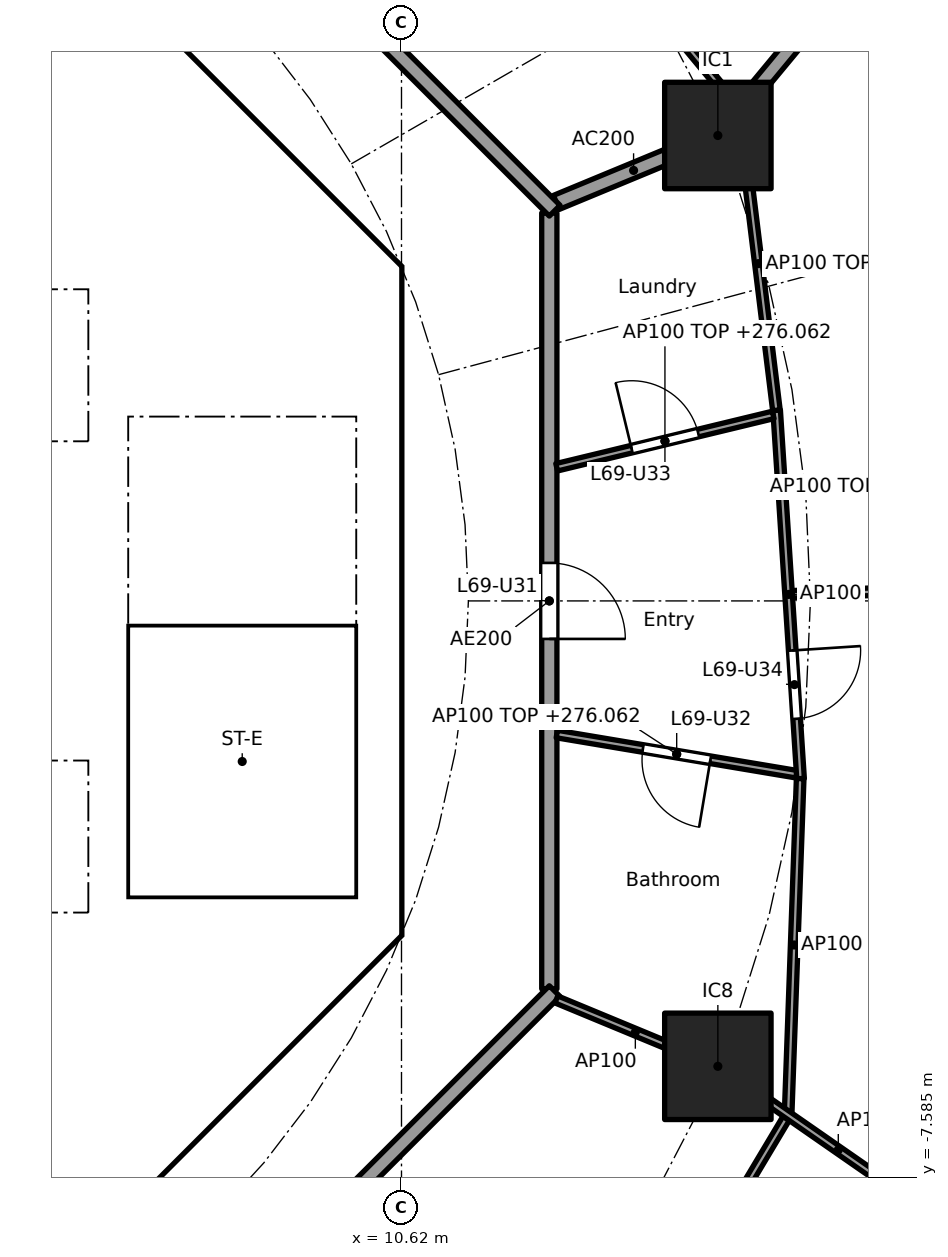
"""IFC4 building model, lengths in metres.
Left out: names, types, materials, properties, quantities, classifications, styles, units other than length and angle.
Written with IfcOpenShell. Run it as: python <this file> out.ifc"""

import sys

from ifc_helpers import new_model, si_unit, direction, frame, frame_2d, origin, origin_2d, place, context, subcontext, project, spatial, polyline, rectangle, outline, extrude, element, fill, save


model = new_model("IFC4")
c1 = context("Model", 3, precision=1e-05, world=origin(), true_north=direction((0.0, 1.0)))
c2 = subcontext(c1, "Body", "Model", "MODEL_VIEW")
j1 = project(units=[si_unit("LENGTHUNIT", "METRE"), si_unit("PLANEANGLEUNIT", "RADIAN")], contexts=[c1])
p1 = place(None, origin())
s1 = spatial("IfcSite", under=j1, at=p1, CompositionType="ELEMENT")
p2 = place(p1, origin())
s2 = spatial("IfcBuilding", under=s1, at=p2, CompositionType="ELEMENT")
p3 = place(p2, frame((0.0, 0.0, 273.3)))
s3 = spatial("IfcBuildingStorey", under=s2, at=p3, CompositionType="ELEMENT", Elevation=273.3)
for number, where, z_axis, x_axis in (
    (1, (14.782, 6.123, 0.0), (0.0, 0.0, 1.0), (1.0, 0.0, 0.0)),
    (2, (14.782, -6.123, 0.0), (0.0, 0.0, 1.0), (1.0, 0.0, 0.0)),
):
    element("IfcColumn", number, at=place(p3, frame(where, z_axis=z_axis, x_axis=x_axis)), inside=s3, PredefinedType="COLUMN", context=c2, shape_type="SweptSolid", body=[
        extrude(rectangle(XDim=1.4, YDim=1.4, at=origin_2d()), origin(), (0.0, 0.0, 1.0), 3.7),
    ])
p4 = place(p3, frame((9.988, 4.613, 0.0), z_axis=(0.0, 0.0, 1.0), x_axis=(-0.707106781187, 0.707106781187, 0.0)))
e3 = element("IfcWall", 3, at=p4, inside=s3, PredefinedType="SHEAR", context=c2, shape_type="SweptSolid", body=[
    extrude(rectangle(XDim=7.602, YDim=0.6, at=frame_2d((3.801, 0.0))), origin(), (0.0, 0.0, 1.0), 3.44),
])
p5 = place(p4, frame((3.201, 0.0, 0.0)))
e4 = element("IfcOpeningElement", 4, at=p5, cuts=e3, PredefinedType="OPENING", context=c2, shape_type="SweptSolid", body=[
    extrude(rectangle(XDim=1.2, YDim=2.1, at=frame_2d((0.6, 1.05))), frame((0.0, 0.31, 0.0), z_axis=(0.0, -1.0, 0.0), x_axis=(1.0, 0.0, 0.0)), (0.0, 0.0, 1.0), 0.62),
])
p6 = place(p3, frame((4.613, -9.988, 0.0), z_axis=(0.0, 0.0, 1.0), x_axis=(0.707106781187, 0.707106781187, 0.0)))
e5 = element("IfcWall", 5, at=p6, inside=s3, PredefinedType="SHEAR", context=c2, shape_type="SweptSolid", body=[
    extrude(rectangle(XDim=7.602, YDim=0.6, at=frame_2d((3.801, 0.0))), origin(), (0.0, 0.0, 1.0), 3.44),
])
p7 = place(p6, frame((3.201, 0.0, 0.0)))
e6 = element("IfcOpeningElement", 6, at=p7, cuts=e5, PredefinedType="OPENING", context=c2, shape_type="SweptSolid", body=[
    extrude(rectangle(XDim=1.2, YDim=2.1, at=frame_2d((0.6, 1.05))), frame((0.0, 0.31, 0.0), z_axis=(0.0, -1.0, 0.0), x_axis=(1.0, 0.0, 0.0)), (0.0, 0.0, 1.0), 0.62),
])
p8 = place(p3, frame((-6.7, 2.0, 0.0), z_axis=(0.0, 0.0, 1.0), x_axis=(1.0, 0.0, 0.0)))
e7 = element("IfcWall", 7, at=p8, inside=s3, PredefinedType="SOLIDWALL", context=c2, shape_type="SweptSolid", body=[
    extrude(rectangle(XDim=13.4, YDim=0.2, at=frame_2d((6.7, 0.0))), origin(), (0.0, 0.0, 1.0), 3.44),
])
p9 = place(p8, frame((11.65, 0.0, 0.0)))
e8 = element("IfcOpeningElement", 8, at=p9, cuts=e7, PredefinedType="OPENING", context=c2, shape_type="SweptSolid", body=[
    extrude(rectangle(XDim=1.1, YDim=2.1, at=frame_2d((0.55, 1.05))), frame((0.0, 0.11, 0.0), z_axis=(0.0, -1.0, 0.0), x_axis=(1.0, 0.0, 0.0)), (0.0, 0.0, 1.0), 0.22),
])
p10 = place(p8, frame((0.75, 0.0, 0.0)))
e9 = element("IfcOpeningElement", 9, at=p10, cuts=e7, PredefinedType="OPENING", context=c2, shape_type="SweptSolid", body=[
    extrude(rectangle(XDim=0.9, YDim=2.1, at=frame_2d((0.45, 1.05))), frame((0.0, 0.11, 0.0), z_axis=(0.0, -1.0, 0.0), x_axis=(1.0, 0.0, 0.0)), (0.0, 0.0, 1.0), 0.22),
])
p11 = place(p8, frame((4.05, 0.0, 0.0)))
e10 = element("IfcOpeningElement", 10, at=p11, cuts=e7, PredefinedType="OPENING", context=c2, shape_type="SweptSolid", body=[
    extrude(rectangle(XDim=0.9, YDim=2.1, at=frame_2d((0.45, 1.05))), frame((0.0, 0.11, 0.0), z_axis=(0.0, -1.0, 0.0), x_axis=(1.0, 0.0, 0.0)), (0.0, 0.0, 1.0), 0.22),
])
p12 = place(p8, frame((7.35, 0.0, 0.0)))
e11 = element("IfcOpeningElement", 11, at=p12, cuts=e7, PredefinedType="OPENING", context=c2, shape_type="SweptSolid", body=[
    extrude(rectangle(XDim=0.9, YDim=2.1, at=frame_2d((0.45, 1.05))), frame((0.0, 0.11, 0.0), z_axis=(0.0, -1.0, 0.0), x_axis=(1.0, 0.0, 0.0)), (0.0, 0.0, 1.0), 0.22),
])
p13 = place(p8, frame((9.55, 0.0, 0.0)))
e12 = element("IfcOpeningElement", 12, at=p13, cuts=e7, PredefinedType="OPENING", context=c2, shape_type="SweptSolid", body=[
    extrude(rectangle(XDim=0.9, YDim=2.1, at=frame_2d((0.45, 1.05))), frame((0.0, 0.11, 0.0), z_axis=(0.0, -1.0, 0.0), x_axis=(1.0, 0.0, 0.0)), (0.0, 0.0, 1.0), 0.22),
])
p14 = place(p3, frame((6.7, 4.0, 0.0), z_axis=(0.0, 0.0, 1.0), x_axis=(1.0, 0.0, 0.0)))
e13 = element("IfcWall", 13, at=p14, inside=s3, PredefinedType="SOLIDWALL", context=c2, shape_type="SweptSolid", body=[
    extrude(rectangle(XDim=3.325, YDim=0.2, at=frame_2d((1.662, 0.0))), origin(), (0.0, 0.0, 1.0), 3.44),
])
p15 = place(p14, frame((1.25, 0.0, 0.0)))
e14 = element("IfcOpeningElement", 14, at=p15, cuts=e13, PredefinedType="OPENING", context=c2, shape_type="SweptSolid", body=[
    extrude(rectangle(XDim=1.1, YDim=2.1, at=frame_2d((0.55, 1.05))), frame((0.0, 0.11, 0.0), z_axis=(0.0, -1.0, 0.0), x_axis=(1.0, 0.0, 0.0)), (0.0, 0.0, 1.0), 0.22),
])
p16 = place(p3, frame((-6.7, -2.0, 0.0), z_axis=(0.0, 0.0, 1.0), x_axis=(1.0, 0.0, 0.0)))
e15 = element("IfcWall", 15, at=p16, inside=s3, PredefinedType="SOLIDWALL", context=c2, shape_type="SweptSolid", body=[
    extrude(rectangle(XDim=13.4, YDim=0.2, at=frame_2d((6.7, 0.0))), origin(), (0.0, 0.0, 1.0), 3.44),
])
p17 = place(p16, frame((9.45, 0.0, 0.0)))
e16 = element("IfcOpeningElement", 16, at=p17, cuts=e15, PredefinedType="OPENING", context=c2, shape_type="SweptSolid", body=[
    extrude(rectangle(XDim=1.1, YDim=2.1, at=frame_2d((0.55, 1.05))), frame((0.0, 0.11, 0.0), z_axis=(0.0, -1.0, 0.0), x_axis=(1.0, 0.0, 0.0)), (0.0, 0.0, 1.0), 0.22),
])
p18 = place(p16, frame((11.65, 0.0, 0.0)))
e17 = element("IfcOpeningElement", 17, at=p18, cuts=e15, PredefinedType="OPENING", context=c2, shape_type="SweptSolid", body=[
    extrude(rectangle(XDim=1.1, YDim=2.1, at=frame_2d((0.55, 1.05))), frame((0.0, 0.11, 0.0), z_axis=(0.0, -1.0, 0.0), x_axis=(1.0, 0.0, 0.0)), (0.0, 0.0, 1.0), 0.22),
])
p19 = place(p16, frame((1.85, 0.0, 0.0)))
e18 = element("IfcOpeningElement", 18, at=p19, cuts=e15, PredefinedType="OPENING", context=c2, shape_type="SweptSolid", body=[
    extrude(rectangle(XDim=0.9, YDim=2.1, at=frame_2d((0.45, 1.05))), frame((0.0, 0.11, 0.0), z_axis=(0.0, -1.0, 0.0), x_axis=(1.0, 0.0, 0.0)), (0.0, 0.0, 1.0), 0.22),
])
p20 = place(p16, frame((6.25, 0.0, 0.0)))
e19 = element("IfcOpeningElement", 19, at=p20, cuts=e15, PredefinedType="OPENING", context=c2, shape_type="SweptSolid", body=[
    extrude(rectangle(XDim=0.9, YDim=2.1, at=frame_2d((0.45, 1.05))), frame((0.0, 0.11, 0.0), z_axis=(0.0, -1.0, 0.0), x_axis=(1.0, 0.0, 0.0)), (0.0, 0.0, 1.0), 0.22),
])
p21 = place(p3, origin())
e20 = element("IfcWall", 20, at=p21, inside=s3, PredefinedType="SHEAR", context=c2, shape_type="SweptSolid", body=[
    extrude(outline(polyline([(9.776, -4.401), (10.025, -4.152), (10.025, -3.801), (10.025, 4.152), (9.776, 4.401), (10.2, 4.825), (10.625, 4.401), (10.625, -4.401), (10.2, -4.825), (9.776, -4.401)])), origin(), (0.0, 0.0, 1.0), 3.44),
])
p22 = place(p3, origin())
e21 = element("IfcWall", 21, at=p22, inside=s3, PredefinedType="SOLIDWALL", context=c2, shape_type="SweptSolid", body=[
    extrude(outline(polyline([(-6.7, 4.3), (6.7, 4.3), (6.7, 2.1), (6.5, 2.1), (6.5, 4.1), (4.5, 4.1), (4.5, 2.1), (4.3, 2.1), (4.3, 4.1), (2.3, 4.1), (2.3, 2.1), (2.1, 2.1), (2.1, 4.1), (0.1, 4.1), (0.1, 2.1), (-0.1, 2.1), (-0.1, 4.1), (-4.3, 4.1), (-4.3, 2.1), (-4.5, 2.1), (-4.5, 4.1), (-6.5, 4.1), (-6.5, 2.1), (-6.7, 2.1), (-6.7, 4.3)])), origin(), (0.0, 0.0, 1.0), 3.44),
])
p23 = place(p3, origin())
e22 = element("IfcWall", 22, at=p23, inside=s3, PredefinedType="SOLIDWALL", context=c2, shape_type="SweptSolid", body=[
    extrude(outline(polyline([(-6.7, -2.1), (-6.5, -2.1), (-6.5, -4.1), (-2.3, -4.1), (-2.3, -2.1), (-2.1, -2.1), (-2.1, -4.1), (2.1, -4.1), (2.1, -2.1), (2.3, -2.1), (2.3, -4.1), (4.3, -4.1), (4.3, -2.1), (4.5, -2.1), (4.5, -4.1), (6.5, -4.1), (6.5, -2.1), (6.7, -2.1), (6.7, -4.3), (-6.7, -4.3), (-6.7, -2.1)])), origin(), (0.0, 0.0, 1.0), 3.44),
])
p24 = place(p3, origin())
e23 = element("IfcWall", 23, at=p24, inside=s3, PredefinedType="SOLIDWALL", context=c2, shape_type="SweptSolid", body=[
    extrude(outline(polyline([(7.025, -3.9), (6.7, -3.9), (6.7, 3.9), (7.025, 3.9), (7.025, -3.9)])), origin(), (0.0, 0.0, 1.0), 3.44),
])
p25 = place(p3, origin())
e24 = element("IfcWall", 24, at=p25, inside=s3, PredefinedType="SOLIDWALL", context=c2, shape_type="SweptSolid", body=[
    extrude(outline(polyline([(10.025, -4.1), (6.7, -4.1), (6.7, -3.9), (10.025, -3.9), (10.025, -4.1)])), origin(), (0.0, 0.0, 1.0), 3.44),
])
p26 = place(p3, frame((12.657, 5.243, 0.0), z_axis=(0.0, 0.0, 1.0), x_axis=(0.923853160736, 0.382747093259, 0.0)))
e25 = element("IfcWall", 25, at=p26, inside=s3, PredefinedType="PARTITIONING", context=c2, shape_type="SweptSolid", body=[
    extrude(rectangle(XDim=2.2, YDim=0.2, at=frame_2d((1.1, 0.0))), origin(), (0.0, 0.0, 1.0), 3.44),
])
p27 = place(p3, frame((14.814, 6.161, 0.0), z_axis=(0.0, 0.0, 1.0), x_axis=(0.638050520313, 0.769994502272, 0.0)))
e26 = element("IfcWall", 26, at=p27, inside=s3, PredefinedType="PARTITIONING", context=c2, shape_type="SweptSolid", body=[
    extrude(rectangle(XDim=3.673, YDim=0.2, at=frame_2d((1.836, 0.0))), origin(), (0.0, 0.0, 1.0), 3.44),
])
p28 = place(p3, frame((12.565, -5.104, 0.0), z_axis=(0.0, 0.0, 1.0), x_axis=(0.0, 1.0, 0.0)))
e27 = element("IfcWall", 27, at=p28, inside=s3, PredefinedType="PARTITIONING", context=c2, shape_type="SweptSolid", body=[
    extrude(rectangle(XDim=10.209, YDim=0.2, at=frame_2d((5.104, 0.0))), origin(), (0.0, 0.0, 1.0), 3.44),
])
p29 = place(p28, frame((4.604, 0.0, 0.0)))
e28 = element("IfcOpeningElement", 28, at=p29, cuts=e27, PredefinedType="OPENING", context=c2, shape_type="SweptSolid", body=[
    extrude(rectangle(XDim=1.0, YDim=2.1, at=frame_2d((0.5, 1.05))), frame((0.0, 0.11, 0.0), z_axis=(0.0, -1.0, 0.0), x_axis=(1.0, 0.0, 0.0)), (0.0, 0.0, 1.0), 0.22),
])
p30 = place(p3, frame((12.635, 5.134, 0.0), z_axis=(0.0, 0.0, 1.0), x_axis=(-0.707106781187, 0.707106781187, 0.0)))
e29 = element("IfcWall", 29, at=p30, inside=s3, PredefinedType="PARTITIONING", context=c2, shape_type="SweptSolid", body=[
    extrude(rectangle(XDim=10.609, YDim=0.2, at=frame_2d((5.305, 0.0))), origin(), (0.0, 0.0, 1.0), 3.44),
])
p31 = place(p3, frame((5.275, -12.494, 0.0), z_axis=(0.0, 0.0, 1.0), x_axis=(0.707106781187, 0.707106781187, 0.0)))
e30 = element("IfcWall", 30, at=p31, inside=s3, PredefinedType="PARTITIONING", context=c2, shape_type="SweptSolid", body=[
    extrude(rectangle(XDim=10.409, YDim=0.2, at=frame_2d((5.205, 0.0))), origin(), (0.0, 0.0, 1.0), 3.44),
])
p32 = place(p3, frame((12.663, -1.751, 0.0), z_axis=(0.0, 0.0, 1.0), x_axis=(0.98626156497, -0.165191178529, 0.0)))
e31 = element("IfcWall", 31, at=p32, inside=s3, PredefinedType="PARTITIONING", context=c2, shape_type="SweptSolid", body=[
    extrude(rectangle(XDim=3.198, YDim=0.1, at=frame_2d((1.599, 0.0))), origin(), (0.0, 0.0, 1.0), 2.762),
])
p33 = place(p32, frame((1.149, 0.0, 0.0)))
e32 = element("IfcOpeningElement", 32, at=p33, cuts=e31, PredefinedType="OPENING", context=c2, shape_type="SweptSolid", body=[
    extrude(rectangle(XDim=0.9, YDim=2.1, at=frame_2d((0.45, 1.05))), frame((0.0, 0.06, 0.0), z_axis=(0.0, -1.0, 0.0), x_axis=(1.0, 0.0, 0.0)), (0.0, 0.0, 1.0), 0.12),
])
p34 = place(p3, frame((15.87, -2.338, 0.0), z_axis=(0.0, 0.0, 1.0), x_axis=(-0.064797294757, 0.997898447034, 0.0)))
e33 = element("IfcWall", 33, at=p34, inside=s3, PredefinedType="PARTITIONING", context=c2, shape_type="SweptSolid", body=[
    extrude(rectangle(XDim=4.857, YDim=0.1, at=frame_2d((2.428, 0.0))), origin(), (0.0, 0.0, 1.0), 3.44),
])
p35 = place(p34, frame((0.789, 0.0, 0.0)))
e34 = element("IfcOpeningElement", 34, at=p35, cuts=e33, PredefinedType="OPENING", context=c2, shape_type="SweptSolid", body=[
    extrude(rectangle(XDim=0.9, YDim=2.1, at=frame_2d((0.45, 1.05))), frame((0.0, 0.06, 0.0), z_axis=(0.0, -1.0, 0.0), x_axis=(1.0, 0.0, 0.0)), (0.0, 0.0, 1.0), 0.12),
])
p36 = place(p3, frame((15.865, -2.338, 0.0), z_axis=(0.0, 0.0, 1.0), x_axis=(-0.035902310383, -0.999355304238, 0.0)))
e35 = element("IfcWall", 35, at=p36, inside=s3, PredefinedType="PARTITIONING", context=c2, shape_type="SweptSolid", body=[
    extrude(rectangle(XDim=4.379, YDim=0.1, at=frame_2d((2.19, 0.0))), origin(), (0.0, 0.0, 1.0), 2.905),
])
p37 = place(p3, frame((15.763, 0.087, 0.0), z_axis=(0.0, 0.0, 1.0), x_axis=(0.999492034598, 0.03186962151, 0.0)))
e36 = element("IfcWall", 36, at=p37, inside=s3, PredefinedType="PARTITIONING", context=c2, shape_type="SweptSolid", body=[
    extrude(rectangle(XDim=4.826, YDim=0.1, at=frame_2d((2.413, 0.0))), origin(), (0.0, 0.0, 1.0), 2.983),
])
p38 = place(p37, frame((1.963, 0.0, 0.0)))
e37 = element("IfcOpeningElement", 37, at=p38, cuts=e36, PredefinedType="OPENING", context=c2, shape_type="SweptSolid", body=[
    extrude(rectangle(XDim=0.9, YDim=2.1, at=frame_2d((0.45, 1.05))), frame((0.0, 0.06, 0.0), z_axis=(0.0, -1.0, 0.0), x_axis=(1.0, 0.0, 0.0)), (0.0, 0.0, 1.0), 0.12),
])
p39 = place(p3, frame((12.662, 1.758, 0.0), z_axis=(0.0, 0.0, 1.0), x_axis=(0.972004827836, 0.234960879007, 0.0)))
e38 = element("IfcWall", 38, at=p39, inside=s3, PredefinedType="PARTITIONING", context=c2, shape_type="SweptSolid", body=[
    extrude(rectangle(XDim=2.93, YDim=0.1, at=frame_2d((1.465, 0.0))), origin(), (0.0, 0.0, 1.0), 2.762),
])
p40 = place(p39, frame((1.015, 0.0, 0.0)))
e39 = element("IfcOpeningElement", 39, at=p40, cuts=e38, PredefinedType="OPENING", context=c2, shape_type="SweptSolid", body=[
    extrude(rectangle(XDim=0.9, YDim=2.1, at=frame_2d((0.45, 1.05))), frame((0.0, 0.06, 0.0), z_axis=(0.0, -1.0, 0.0), x_axis=(1.0, 0.0, 0.0)), (0.0, 0.0, 1.0), 0.12),
])
p41 = place(p3, frame((15.552, 2.508, 0.0), z_axis=(0.0, 0.0, 1.0), x_axis=(-0.12196293976, 0.992534654974, 0.0)))
e40 = element("IfcWall", 40, at=p41, inside=s3, PredefinedType="PARTITIONING", context=c2, shape_type="SweptSolid", body=[
    extrude(rectangle(XDim=3.887, YDim=0.1, at=frame_2d((1.944, 0.0))), origin(), (0.0, 0.0, 1.0), 2.905),
])
p42 = place(p3, frame((15.002, 6.543, 0.0), z_axis=(0.0, 0.0, 1.0), x_axis=(-0.637932656528, 0.770092154054, 0.0)))
e41 = element("IfcWall", 41, at=p42, inside=s3, PredefinedType="PARTITIONING", context=c2, shape_type="SweptSolid", body=[
    extrude(rectangle(XDim=6.311, YDim=0.1, at=frame_2d((3.155, 0.0))), origin(), (0.0, 0.0, 1.0), 2.905),
])
p43 = place(p3, frame((13.157, -11.033, 0.0), z_axis=(0.0, 0.0, 1.0), x_axis=(0.512736548388, 0.858545998737, 0.0)))
e42 = element("IfcWall", 42, at=p43, inside=s3, PredefinedType="PARTITIONING", context=c2, shape_type="SweptSolid", body=[
    extrude(rectangle(XDim=4.922, YDim=0.1, at=frame_2d((2.461, 0.0))), origin(), (0.0, 0.0, 1.0), 2.905),
])
p44 = place(p3, frame((12.657, -5.243, 0.0), z_axis=(0.0, 0.0, 1.0), x_axis=(0.923864733477, -0.382719158442, 0.0)))
e43 = element("IfcWall", 43, at=p44, inside=s3, PredefinedType="PARTITIONING", context=c2, shape_type="SweptSolid", body=[
    extrude(rectangle(XDim=2.25, YDim=0.1, at=frame_2d((1.125, 0.0))), origin(), (0.0, 0.0, 1.0), 3.44),
])
p45 = place(p3, frame((14.823, -6.151, 0.0), z_axis=(0.0, 0.0, 1.0), x_axis=(0.821435065081, -0.570302054928, 0.0)))
e44 = element("IfcWall", 44, at=p45, inside=s3, PredefinedType="PARTITIONING", context=c2, shape_type="SweptSolid", body=[
    extrude(rectangle(XDim=5.368, YDim=0.1, at=frame_2d((2.684, 0.0))), origin(), (0.0, 0.0, 1.0), 3.44),
])
p46 = place(p45, frame((2.771, 0.0, 0.0)))
e45 = element("IfcOpeningElement", 45, at=p46, cuts=e44, PredefinedType="OPENING", context=c2, shape_type="SweptSolid", body=[
    extrude(rectangle(XDim=0.9, YDim=2.1, at=frame_2d((0.45, 1.05))), frame((0.0, 0.06, 0.0), z_axis=(0.0, -1.0, 0.0), x_axis=(1.0, 0.0, 0.0)), (0.0, 0.0, 1.0), 0.12),
])
p47 = place(p9, origin())
e46 = element("IfcDoor", 46, at=p47, inside=s3, OperationType="DOUBLE_DOOR_SLIDING", PredefinedType="DOOR", context=c2, shape_type="SweptSolid", body=[
    extrude(rectangle(XDim=1.1, YDim=2.1, at=frame_2d((0.55, 1.05))), frame((0.0, 0.025, 0.0), z_axis=(0.0, -1.0, 0.0), x_axis=(1.0, 0.0, 0.0)), (0.0, 0.0, 1.0), 0.05),
])
fill(e8, e46)
p48 = place(p18, origin())
e47 = element("IfcDoor", 47, at=p48, inside=s3, OperationType="DOUBLE_DOOR_SLIDING", PredefinedType="DOOR", context=c2, shape_type="SweptSolid", body=[
    extrude(rectangle(XDim=1.1, YDim=2.1, at=frame_2d((0.55, 1.05))), frame((0.0, 0.025, 0.0), z_axis=(0.0, -1.0, 0.0), x_axis=(1.0, 0.0, 0.0)), (0.0, 0.0, 1.0), 0.05),
])
fill(e17, e47)
p49 = place(p15, frame((1.1, 0.0, 0.0), x_axis=(-1.0, 0.0, 0.0)))
e48 = element("IfcDoor", 48, at=p49, inside=s3, OperationType="SINGLE_SWING_RIGHT", PredefinedType="DOOR", context=c2, shape_type="SweptSolid", body=[
    extrude(rectangle(XDim=1.1, YDim=2.1, at=frame_2d((0.55, 1.05))), frame((0.0, 0.025, 0.0), z_axis=(0.0, -1.0, 0.0), x_axis=(1.0, 0.0, 0.0)), (0.0, 0.0, 1.0), 0.05),
])
fill(e14, e48)
p50 = place(p5, origin())
e49 = element("IfcDoor", 49, at=p50, inside=s3, OperationType="SINGLE_SWING_RIGHT", PredefinedType="DOOR", context=c2, shape_type="SweptSolid", body=[
    extrude(rectangle(XDim=1.2, YDim=2.1, at=frame_2d((0.6, 1.05))), frame((0.0, 0.025, 0.0), z_axis=(0.0, -1.0, 0.0), x_axis=(1.0, 0.0, 0.0)), (0.0, 0.0, 1.0), 0.05),
])
fill(e4, e49)
p51 = place(p7, origin())
e50 = element("IfcDoor", 50, at=p51, inside=s3, OperationType="SINGLE_SWING_RIGHT", PredefinedType="DOOR", context=c2, shape_type="SweptSolid", body=[
    extrude(rectangle(XDim=1.2, YDim=2.1, at=frame_2d((0.6, 1.05))), frame((0.0, 0.025, 0.0), z_axis=(0.0, -1.0, 0.0), x_axis=(1.0, 0.0, 0.0)), (0.0, 0.0, 1.0), 0.05),
])
fill(e6, e50)
p52 = place(p29, frame((1.0, 0.0, 0.0), x_axis=(-1.0, 0.0, 0.0)))
e51 = element("IfcDoor", 51, at=p52, inside=s3, OperationType="SINGLE_SWING_RIGHT", PredefinedType="DOOR", context=c2, shape_type="SweptSolid", body=[
    extrude(rectangle(XDim=1.0, YDim=2.1, at=frame_2d((0.5, 1.05))), frame((0.0, 0.025, 0.0), z_axis=(0.0, -1.0, 0.0), x_axis=(1.0, 0.0, 0.0)), (0.0, 0.0, 1.0), 0.05),
])
fill(e28, e51)
p53 = place(p33, frame((0.9, 0.0, 0.0), x_axis=(-1.0, 0.0, 0.0)))
e52 = element("IfcDoor", 52, at=p53, inside=s3, OperationType="SINGLE_SWING_LEFT", PredefinedType="DOOR", context=c2, shape_type="SweptSolid", body=[
    extrude(rectangle(XDim=0.9, YDim=2.1, at=frame_2d((0.45, 1.05))), frame((0.0, 0.025, 0.0), z_axis=(0.0, -1.0, 0.0), x_axis=(1.0, 0.0, 0.0)), (0.0, 0.0, 1.0), 0.05),
])
fill(e32, e52)
p54 = place(p40, origin())
e53 = element("IfcDoor", 53, at=p54, inside=s3, OperationType="SINGLE_SWING_LEFT", PredefinedType="DOOR", context=c2, shape_type="SweptSolid", body=[
    extrude(rectangle(XDim=0.9, YDim=2.1, at=frame_2d((0.45, 1.05))), frame((0.0, 0.025, 0.0), z_axis=(0.0, -1.0, 0.0), x_axis=(1.0, 0.0, 0.0)), (0.0, 0.0, 1.0), 0.05),
])
fill(e39, e53)
p55 = place(p35, frame((0.9, 0.0, 0.0), x_axis=(-1.0, 0.0, 0.0)))
e54 = element("IfcDoor", 54, at=p55, inside=s3, OperationType="SINGLE_SWING_LEFT", PredefinedType="DOOR", context=c2, shape_type="SweptSolid", body=[
    extrude(rectangle(XDim=0.9, YDim=2.1, at=frame_2d((0.45, 1.05))), frame((0.0, 0.025, 0.0), z_axis=(0.0, -1.0, 0.0), x_axis=(1.0, 0.0, 0.0)), (0.0, 0.0, 1.0), 0.05),
])
fill(e34, e54)
save(model, sys.argv[1])
